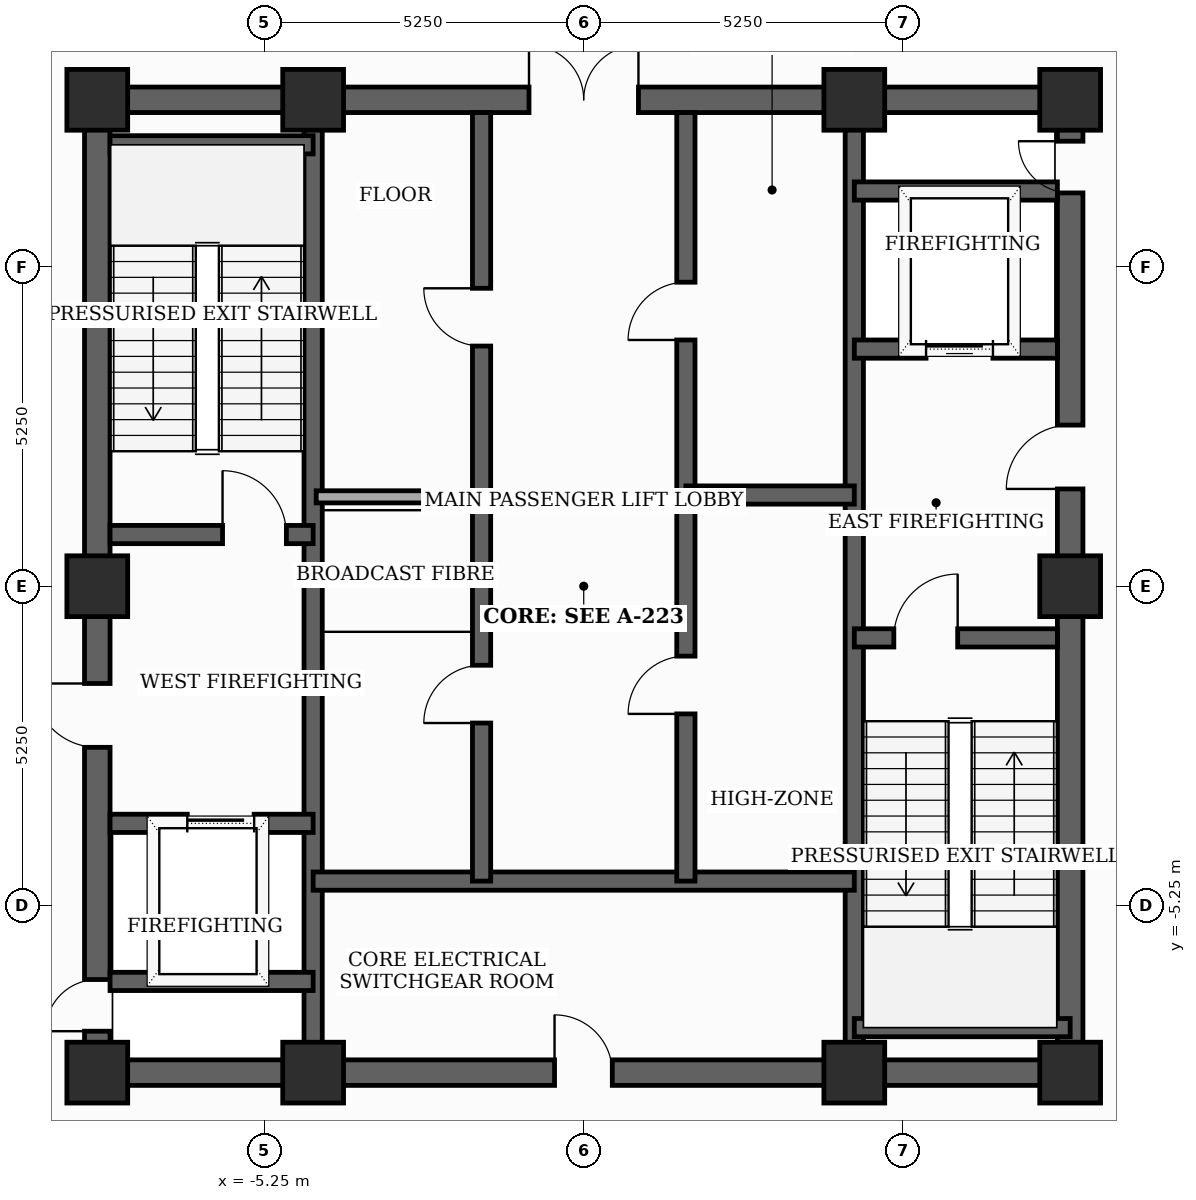
"""IFC4 building model, lengths in metres.
Left out: names, types, materials, properties, quantities, classifications, styles, units other than length and angle.
Written with IfcOpenShell. Run it as: python <this file> out.ifc"""

import sys

from ifc_helpers import new_model, si_unit, direction, frame, frame_2d, origin, origin_2d, place, context, subcontext, project, spatial, rectangle, extrude, element, fill, save


model = new_model("IFC4")
c1 = context("Model", 3, precision=1e-05, world=origin(), true_north=direction((0.0, 1.0)))
c2 = subcontext(c1, "Body", "Model", "MODEL_VIEW")
j1 = project(units=[si_unit("LENGTHUNIT", "METRE"), si_unit("PLANEANGLEUNIT", "RADIAN")], contexts=[c1])
p1 = place(None, origin())
s1 = spatial("IfcSite", under=j1, at=p1, CompositionType="ELEMENT")
p2 = place(p1, origin())
s2 = spatial("IfcBuilding", under=s1, at=p2, CompositionType="ELEMENT")
p3 = place(p2, frame((0.0, 0.0, 317.4)))
s3 = spatial("IfcBuildingStorey", under=s2, at=p3, CompositionType="ELEMENT", Elevation=317.4)
for number, where, z_axis, x_axis in (
    (1, (-8.0, -8.0, 0.0), (0.0, 0.0, 1.0), (1.0, 0.0, 0.0)),
    (2, (-4.45, -8.0, 0.0), (0.0, 0.0, 1.0), (1.0, 0.0, 0.0)),
    (3, (4.45, -8.0, 0.0), (0.0, 0.0, 1.0), (1.0, 0.0, 0.0)),
    (4, (8.0, -8.0, 0.0), (0.0, 0.0, 1.0), (1.0, 0.0, 0.0)),
    (5, (8.0, 0.0, 0.0), (0.0, 0.0, 1.0), (1.0, 0.0, 0.0)),
    (6, (8.0, 8.0, 0.0), (0.0, 0.0, 1.0), (1.0, 0.0, 0.0)),
    (7, (4.45, 8.0, 0.0), (0.0, 0.0, 1.0), (1.0, 0.0, 0.0)),
    (8, (-4.45, 8.0, 0.0), (0.0, 0.0, 1.0), (1.0, 0.0, 0.0)),
    (9, (-8.0, 8.0, 0.0), (0.0, 0.0, 1.0), (1.0, 0.0, 0.0)),
    (10, (-8.0, 0.0, 0.0), (0.0, 0.0, 1.0), (1.0, 0.0, 0.0)),
):
    element("IfcColumn", number, at=place(p3, frame(where, z_axis=z_axis, x_axis=x_axis)), inside=s3, PredefinedType="COLUMN", context=c2, shape_type="SweptSolid", body=[
        extrude(rectangle(XDim=1.0, YDim=1.0, at=origin_2d()), origin(), (0.0, 0.0, 1.0), 4.6),
    ])
p4 = place(p3, frame((-8.0, -8.0, 0.0), z_axis=(0.0, 0.0, 1.0), x_axis=(0.0, 1.0, 0.0)))
e11 = element("IfcWall", 11, at=p4, inside=s3, PredefinedType="SHEAR", context=c2, shape_type="SweptSolid", body=[
    extrude(rectangle(XDim=16.0, YDim=0.42, at=frame_2d((8.0, 0.0))), origin(), (0.0, 0.0, 1.0), 4.38),
])
p5 = place(p4, frame((0.681, 0.0, 0.0)))
e12 = element("IfcOpeningElement", 12, at=p5, cuts=e11, PredefinedType="OPENING", context=c2, shape_type="SweptSolid", body=[
    extrude(rectangle(XDim=0.85, YDim=2.02, at=frame_2d((0.425, 1.01))), frame((0.0, 0.22, 0.0), z_axis=(0.0, -1.0, 0.0), x_axis=(1.0, 0.0, 0.0)), (0.0, 0.0, 1.0), 0.44),
])
p6 = place(p4, frame((5.35, 0.0, 0.0)))
e13 = element("IfcOpeningElement", 13, at=p6, cuts=e11, PredefinedType="OPENING", context=c2, shape_type="SweptSolid", body=[
    extrude(rectangle(XDim=1.05, YDim=2.15, at=frame_2d((0.525, 1.075))), frame((0.0, 0.22, 0.0), z_axis=(0.0, -1.0, 0.0), x_axis=(1.0, 0.0, 0.0)), (0.0, 0.0, 1.0), 0.44),
])
p7 = place(p3, frame((8.0, -8.0, 0.0), z_axis=(0.0, 0.0, 1.0), x_axis=(0.0, 1.0, 0.0)))
e14 = element("IfcWall", 14, at=p7, inside=s3, PredefinedType="SHEAR", context=c2, shape_type="SweptSolid", body=[
    extrude(rectangle(XDim=16.0, YDim=0.42, at=frame_2d((8.0, 0.0))), origin(), (0.0, 0.0, 1.0), 4.38),
])
p8 = place(p7, frame((9.6, 0.0, 0.0)))
e15 = element("IfcOpeningElement", 15, at=p8, cuts=e14, PredefinedType="OPENING", context=c2, shape_type="SweptSolid", body=[
    extrude(rectangle(XDim=1.05, YDim=2.15, at=frame_2d((0.525, 1.075))), frame((0.0, 0.22, 0.0), z_axis=(0.0, -1.0, 0.0), x_axis=(1.0, 0.0, 0.0)), (0.0, 0.0, 1.0), 0.44),
])
p9 = place(p7, frame((14.469, 0.0, 0.0)))
e16 = element("IfcOpeningElement", 16, at=p9, cuts=e14, PredefinedType="OPENING", context=c2, shape_type="SweptSolid", body=[
    extrude(rectangle(XDim=0.85, YDim=2.02, at=frame_2d((0.425, 1.01))), frame((0.0, 0.22, 0.0), z_axis=(0.0, -1.0, 0.0), x_axis=(1.0, 0.0, 0.0)), (0.0, 0.0, 1.0), 0.44),
])
p10 = place(p3, frame((-8.0, -8.0, 0.0), z_axis=(0.0, 0.0, 1.0), x_axis=(1.0, 0.0, 0.0)))
e17 = element("IfcWall", 17, at=p10, inside=s3, PredefinedType="SHEAR", context=c2, shape_type="SweptSolid", body=[
    extrude(rectangle(XDim=16.0, YDim=0.42, at=frame_2d((8.0, 0.0))), origin(), (0.0, 0.0, 1.0), 4.38),
])
p11 = place(p10, frame((7.52, 0.0, 0.0)))
e18 = element("IfcOpeningElement", 18, at=p11, cuts=e17, PredefinedType="OPENING", context=c2, shape_type="SweptSolid", body=[
    extrude(rectangle(XDim=0.95, YDim=2.1, at=frame_2d((0.475, 1.05))), frame((0.0, 0.22, 0.0), z_axis=(0.0, -1.0, 0.0), x_axis=(1.0, 0.0, 0.0)), (0.0, 0.0, 1.0), 0.44),
])
p12 = place(p3, frame((-8.0, 8.0, 0.0), z_axis=(0.0, 0.0, 1.0), x_axis=(1.0, 0.0, 0.0)))
e19 = element("IfcWall", 19, at=p12, inside=s3, PredefinedType="SHEAR", context=c2, shape_type="SweptSolid", body=[
    extrude(rectangle(XDim=16.0, YDim=0.42, at=frame_2d((8.0, 0.0))), origin(), (0.0, 0.0, 1.0), 4.38),
])
p13 = place(p12, frame((7.1, 0.0, 0.0)))
e20 = element("IfcOpeningElement", 20, at=p13, cuts=e19, PredefinedType="OPENING", context=c2, shape_type="SweptSolid", body=[
    extrude(rectangle(XDim=1.8, YDim=2.15, at=frame_2d((0.9, 1.075))), frame((0.0, 0.22, 0.0), z_axis=(0.0, -1.0, 0.0), x_axis=(1.0, 0.0, 0.0)), (0.0, 0.0, 1.0), 0.44),
])
for number, where, z_axis, x_axis in (
    (21, (-4.45, -7.79, 0.0), (0.0, 0.0, 1.0), (0.0, 1.0, 0.0)),
    (22, (4.45, -7.79, 0.0), (0.0, 0.0, 1.0), (0.0, 1.0, 0.0)),
):
    element("IfcWall", number, at=place(p3, frame(where, z_axis=z_axis, x_axis=x_axis)), inside=s3, PredefinedType="SHEAR", context=c2, shape_type="SweptSolid", body=[
        extrude(rectangle(XDim=15.58, YDim=0.3, at=frame_2d((7.79, 0.0))), origin(), (0.0, 0.0, 1.0), 4.38),
    ])
p14 = place(p3, frame((-7.79, 0.85, 0.0), z_axis=(0.0, 0.0, 1.0), x_axis=(1.0, 0.0, 0.0)))
e23 = element("IfcWall", 23, at=p14, inside=s3, PredefinedType="SHEAR", context=c2, shape_type="SweptSolid", body=[
    extrude(rectangle(XDim=3.34, YDim=0.3, at=frame_2d((1.67, 0.0))), origin(), (0.0, 0.0, 1.0), 4.38),
])
p15 = place(p14, frame((1.85, 0.0, 0.0)))
e24 = element("IfcOpeningElement", 24, at=p15, cuts=e23, PredefinedType="OPENING", context=c2, shape_type="SweptSolid", body=[
    extrude(rectangle(XDim=1.05, YDim=2.15, at=frame_2d((0.525, 1.075))), frame((0.0, 0.16, 0.0), z_axis=(0.0, -1.0, 0.0), x_axis=(1.0, 0.0, 0.0)), (0.0, 0.0, 1.0), 0.32),
])
p16 = place(p3, frame((-7.79, 7.26, 0.0), z_axis=(0.0, 0.0, 1.0), x_axis=(1.0, 0.0, 0.0)))
e25 = element("IfcWall", 25, at=p16, inside=s3, PredefinedType="SHEAR", context=c2, shape_type="SweptSolid", body=[
    extrude(rectangle(XDim=3.34, YDim=0.3, at=frame_2d((1.67, 0.0))), origin(), (0.0, 0.0, 1.0), 4.38),
])
p17 = place(p3, frame((4.45, -0.85, 0.0), z_axis=(0.0, 0.0, 1.0), x_axis=(1.0, 0.0, 0.0)))
e26 = element("IfcWall", 26, at=p17, inside=s3, PredefinedType="SHEAR", context=c2, shape_type="SweptSolid", body=[
    extrude(rectangle(XDim=3.34, YDim=0.3, at=frame_2d((1.67, 0.0))), origin(), (0.0, 0.0, 1.0), 4.38),
])
p18 = place(p17, frame((0.65, 0.0, 0.0)))
e27 = element("IfcOpeningElement", 27, at=p18, cuts=e26, PredefinedType="OPENING", context=c2, shape_type="SweptSolid", body=[
    extrude(rectangle(XDim=1.05, YDim=2.15, at=frame_2d((0.525, 1.075))), frame((0.0, 0.16, 0.0), z_axis=(0.0, -1.0, 0.0), x_axis=(1.0, 0.0, 0.0)), (0.0, 0.0, 1.0), 0.32),
])
p19 = place(p3, frame((4.45, -7.26, 0.0), z_axis=(0.0, 0.0, 1.0), x_axis=(1.0, 0.0, 0.0)))
e28 = element("IfcWall", 28, at=p19, inside=s3, PredefinedType="SHEAR", context=c2, shape_type="SweptSolid", body=[
    extrude(rectangle(XDim=3.55, YDim=0.3, at=frame_2d((1.775, 0.0))), origin(), (0.0, 0.0, 1.0), 4.38),
])
p20 = place(p3, frame((-7.79, -3.9, 0.0), z_axis=(0.0, 0.0, 1.0), x_axis=(1.0, 0.0, 0.0)))
e29 = element("IfcWall", 29, at=p20, inside=s3, PredefinedType="SHEAR", context=c2, shape_type="SweptSolid", body=[
    extrude(rectangle(XDim=3.34, YDim=0.3, at=frame_2d((1.67, 0.0))), origin(), (0.0, 0.0, 1.0), 4.38),
])
p21 = place(p20, frame((1.27, 0.0, 0.0)))
e30 = element("IfcOpeningElement", 30, at=p21, cuts=e29, PredefinedType="OPENING", context=c2, shape_type="SweptSolid", body=[
    extrude(rectangle(XDim=1.1, YDim=2.1, at=frame_2d((0.55, 1.05))), frame((0.0, 0.16, 0.0), z_axis=(0.0, -1.0, 0.0), x_axis=(1.0, 0.0, 0.0)), (0.0, 0.0, 1.0), 0.32),
])
p22 = place(p3, frame((-7.79, -6.5, 0.0), z_axis=(0.0, 0.0, 1.0), x_axis=(1.0, 0.0, 0.0)))
e31 = element("IfcWall", 31, at=p22, inside=s3, PredefinedType="SHEAR", context=c2, shape_type="SweptSolid", body=[
    extrude(rectangle(XDim=3.34, YDim=0.3, at=frame_2d((1.67, 0.0))), origin(), (0.0, 0.0, 1.0), 4.38),
])
p23 = place(p3, frame((4.45, 3.9, 0.0), z_axis=(0.0, 0.0, 1.0), x_axis=(1.0, 0.0, 0.0)))
e32 = element("IfcWall", 32, at=p23, inside=s3, PredefinedType="SHEAR", context=c2, shape_type="SweptSolid", body=[
    extrude(rectangle(XDim=3.34, YDim=0.3, at=frame_2d((1.67, 0.0))), origin(), (0.0, 0.0, 1.0), 4.38),
])
p24 = place(p23, frame((1.18, 0.0, 0.0)))
e33 = element("IfcOpeningElement", 33, at=p24, cuts=e32, PredefinedType="OPENING", context=c2, shape_type="SweptSolid", body=[
    extrude(rectangle(XDim=1.1, YDim=2.1, at=frame_2d((0.55, 1.05))), frame((0.0, 0.16, 0.0), z_axis=(0.0, -1.0, 0.0), x_axis=(1.0, 0.0, 0.0)), (0.0, 0.0, 1.0), 0.32),
])
p25 = place(p3, frame((4.45, 6.5, 0.0), z_axis=(0.0, 0.0, 1.0), x_axis=(1.0, 0.0, 0.0)))
e34 = element("IfcWall", 34, at=p25, inside=s3, PredefinedType="SHEAR", context=c2, shape_type="SweptSolid", body=[
    extrude(rectangle(XDim=3.34, YDim=0.3, at=frame_2d((1.67, 0.0))), origin(), (0.0, 0.0, 1.0), 4.38),
])
p26 = place(p3, frame((-4.45, -4.85, 0.0), z_axis=(0.0, 0.0, 1.0), x_axis=(1.0, 0.0, 0.0)))
e35 = element("IfcWall", 35, at=p26, inside=s3, PredefinedType="SHEAR", context=c2, shape_type="SweptSolid", body=[
    extrude(rectangle(XDim=8.9, YDim=0.3, at=frame_2d((4.45, 0.0))), origin(), (0.0, 0.0, 1.0), 4.38),
])
p27 = place(p3, frame((-1.68, -4.85, 0.0), z_axis=(0.0, 0.0, 1.0), x_axis=(0.0, 1.0, 0.0)))
e36 = element("IfcWall", 36, at=p27, inside=s3, PredefinedType="SHEAR", context=c2, shape_type="SweptSolid", body=[
    extrude(rectangle(XDim=12.64, YDim=0.3, at=frame_2d((6.32, 0.0))), origin(), (0.0, 0.0, 1.0), 4.38),
])
p28 = place(p27, frame((2.6, 0.0, 0.0)))
e37 = element("IfcOpeningElement", 37, at=p28, cuts=e36, PredefinedType="OPENING", context=c2, shape_type="SweptSolid", body=[
    extrude(rectangle(XDim=0.95, YDim=2.1, at=frame_2d((0.475, 1.05))), frame((0.0, 0.16, 0.0), z_axis=(0.0, -1.0, 0.0), x_axis=(1.0, 0.0, 0.0)), (0.0, 0.0, 1.0), 0.32),
])
p29 = place(p27, frame((8.8, 0.0, 0.0)))
e38 = element("IfcOpeningElement", 38, at=p29, cuts=e36, PredefinedType="OPENING", context=c2, shape_type="SweptSolid", body=[
    extrude(rectangle(XDim=0.95, YDim=2.1, at=frame_2d((0.475, 1.05))), frame((0.0, 0.16, 0.0), z_axis=(0.0, -1.0, 0.0), x_axis=(1.0, 0.0, 0.0)), (0.0, 0.0, 1.0), 0.32),
])
p30 = place(p3, frame((1.68, -4.85, 0.0), z_axis=(0.0, 0.0, 1.0), x_axis=(0.0, 1.0, 0.0)))
e39 = element("IfcWall", 39, at=p30, inside=s3, PredefinedType="SHEAR", context=c2, shape_type="SweptSolid", body=[
    extrude(rectangle(XDim=12.64, YDim=0.3, at=frame_2d((6.32, 0.0))), origin(), (0.0, 0.0, 1.0), 4.38),
])
p31 = place(p30, frame((2.75, 0.0, 0.0)))
e40 = element("IfcOpeningElement", 40, at=p31, cuts=e39, PredefinedType="OPENING", context=c2, shape_type="SweptSolid", body=[
    extrude(rectangle(XDim=0.95, YDim=2.1, at=frame_2d((0.475, 1.05))), frame((0.0, 0.16, 0.0), z_axis=(0.0, -1.0, 0.0), x_axis=(1.0, 0.0, 0.0)), (0.0, 0.0, 1.0), 0.32),
])
p32 = place(p30, frame((8.9, 0.0, 0.0)))
e41 = element("IfcOpeningElement", 41, at=p32, cuts=e39, PredefinedType="OPENING", context=c2, shape_type="SweptSolid", body=[
    extrude(rectangle(XDim=0.95, YDim=2.1, at=frame_2d((0.475, 1.05))), frame((0.0, 0.16, 0.0), z_axis=(0.0, -1.0, 0.0), x_axis=(1.0, 0.0, 0.0)), (0.0, 0.0, 1.0), 0.32),
])
p33 = place(p3, frame((1.68, 1.5, 0.0), z_axis=(0.0, 0.0, 1.0), x_axis=(1.0, 0.0, 0.0)))
e42 = element("IfcWall", 42, at=p33, inside=s3, PredefinedType="SHEAR", context=c2, shape_type="SweptSolid", body=[
    extrude(rectangle(XDim=2.77, YDim=0.3, at=frame_2d((1.385, 0.0))), origin(), (0.0, 0.0, 1.0), 4.38),
])
p34 = place(p3, frame((-4.4, 1.47, 0.0), z_axis=(0.0, 0.0, 1.0), x_axis=(1.0, 0.0, 0.0)))
e43 = element("IfcWall", 43, at=p34, inside=s3, PredefinedType="SOLIDWALL", context=c2, shape_type="SweptSolid", body=[
    extrude(rectangle(XDim=2.68, YDim=0.2, at=frame_2d((1.34, 0.0))), origin(), (0.0, 0.0, 1.0), 2.685),
])
p35 = place(p5, origin())
e44 = element("IfcDoor", 44, at=p35, inside=s3, OperationType="SINGLE_SWING_LEFT", PredefinedType="TRAPDOOR", context=c2, shape_type="SweptSolid", body=[
    extrude(rectangle(XDim=0.85, YDim=2.02, at=frame_2d((0.425, 1.01))), frame((0.0, 0.025, 0.0), z_axis=(0.0, -1.0, 0.0), x_axis=(1.0, 0.0, 0.0)), (0.0, 0.0, 1.0), 0.05),
])
fill(e12, e44)
p36 = place(p6, origin())
e45 = element("IfcDoor", 45, at=p36, inside=s3, OperationType="SINGLE_SWING_RIGHT", PredefinedType="DOOR", context=c2, shape_type="SweptSolid", body=[
    extrude(rectangle(XDim=1.05, YDim=2.15, at=frame_2d((0.525, 1.075))), frame((0.0, 0.025, 0.0), z_axis=(0.0, -1.0, 0.0), x_axis=(1.0, 0.0, 0.0)), (0.0, 0.0, 1.0), 0.05),
])
fill(e13, e45)
p37 = place(p8, origin())
e46 = element("IfcDoor", 46, at=p37, inside=s3, OperationType="SINGLE_SWING_LEFT", PredefinedType="DOOR", context=c2, shape_type="SweptSolid", body=[
    extrude(rectangle(XDim=1.05, YDim=2.15, at=frame_2d((0.525, 1.075))), frame((0.0, 0.025, 0.0), z_axis=(0.0, -1.0, 0.0), x_axis=(1.0, 0.0, 0.0)), (0.0, 0.0, 1.0), 0.05),
])
fill(e15, e46)
p38 = place(p9, origin())
e47 = element("IfcDoor", 47, at=p38, inside=s3, OperationType="SINGLE_SWING_RIGHT", PredefinedType="TRAPDOOR", context=c2, shape_type="SweptSolid", body=[
    extrude(rectangle(XDim=0.85, YDim=2.02, at=frame_2d((0.425, 1.01))), frame((0.0, 0.025, 0.0), z_axis=(0.0, -1.0, 0.0), x_axis=(1.0, 0.0, 0.0)), (0.0, 0.0, 1.0), 0.05),
])
fill(e16, e47)
p39 = place(p11, origin())
e48 = element("IfcDoor", 48, at=p39, inside=s3, OperationType="SINGLE_SWING_LEFT", PredefinedType="DOOR", context=c2, shape_type="SweptSolid", body=[
    extrude(rectangle(XDim=0.95, YDim=2.1, at=frame_2d((0.475, 1.05))), frame((0.0, 0.025, 0.0), z_axis=(0.0, -1.0, 0.0), x_axis=(1.0, 0.0, 0.0)), (0.0, 0.0, 1.0), 0.05),
])
fill(e18, e48)
p40 = place(p13, origin())
e49 = element("IfcDoor", 49, at=p40, inside=s3, OperationType="DOUBLE_DOOR_SINGLE_SWING", PredefinedType="DOOR", context=c2, shape_type="SweptSolid", body=[
    extrude(rectangle(XDim=1.8, YDim=2.15, at=frame_2d((0.9, 1.075))), frame((0.0, 0.025, 0.0), z_axis=(0.0, -1.0, 0.0), x_axis=(1.0, 0.0, 0.0)), (0.0, 0.0, 1.0), 0.05),
])
fill(e20, e49)
p41 = place(p15, origin())
e50 = element("IfcDoor", 50, at=p41, inside=s3, OperationType="SINGLE_SWING_LEFT", PredefinedType="DOOR", context=c2, shape_type="SweptSolid", body=[
    extrude(rectangle(XDim=1.05, YDim=2.15, at=frame_2d((0.525, 1.075))), frame((0.0, 0.025, 0.0), z_axis=(0.0, -1.0, 0.0), x_axis=(1.0, 0.0, 0.0)), (0.0, 0.0, 1.0), 0.05),
])
fill(e24, e50)
p42 = place(p18, origin())
e51 = element("IfcDoor", 51, at=p42, inside=s3, OperationType="SINGLE_SWING_RIGHT", PredefinedType="DOOR", context=c2, shape_type="SweptSolid", body=[
    extrude(rectangle(XDim=1.05, YDim=2.15, at=frame_2d((0.525, 1.075))), frame((0.0, 0.025, 0.0), z_axis=(0.0, -1.0, 0.0), x_axis=(1.0, 0.0, 0.0)), (0.0, 0.0, 1.0), 0.05),
])
fill(e27, e51)
p43 = place(p21, origin())
e52 = element("IfcDoor", 52, at=p43, inside=s3, OperationType="SLIDING_TO_LEFT", PredefinedType="DOOR", context=c2, shape_type="SweptSolid", body=[
    extrude(rectangle(XDim=1.1, YDim=2.1, at=frame_2d((0.55, 1.05))), frame((0.0, 0.025, 0.0), z_axis=(0.0, -1.0, 0.0), x_axis=(1.0, 0.0, 0.0)), (0.0, 0.0, 1.0), 0.05),
])
fill(e30, e52)
p44 = place(p24, origin())
e53 = element("IfcDoor", 53, at=p44, inside=s3, OperationType="SLIDING_TO_LEFT", PredefinedType="DOOR", context=c2, shape_type="SweptSolid", body=[
    extrude(rectangle(XDim=1.1, YDim=2.1, at=frame_2d((0.55, 1.05))), frame((0.0, 0.025, 0.0), z_axis=(0.0, -1.0, 0.0), x_axis=(1.0, 0.0, 0.0)), (0.0, 0.0, 1.0), 0.05),
])
fill(e33, e53)
p45 = place(p28, origin())
e54 = element("IfcDoor", 54, at=p45, inside=s3, OperationType="SINGLE_SWING_LEFT", PredefinedType="DOOR", context=c2, shape_type="SweptSolid", body=[
    extrude(rectangle(XDim=0.95, YDim=2.1, at=frame_2d((0.475, 1.05))), frame((0.0, 0.025, 0.0), z_axis=(0.0, -1.0, 0.0), x_axis=(1.0, 0.0, 0.0)), (0.0, 0.0, 1.0), 0.05),
])
fill(e37, e54)
p46 = place(p29, origin())
e55 = element("IfcDoor", 55, at=p46, inside=s3, OperationType="SINGLE_SWING_RIGHT", PredefinedType="DOOR", context=c2, shape_type="SweptSolid", body=[
    extrude(rectangle(XDim=0.95, YDim=2.1, at=frame_2d((0.475, 1.05))), frame((0.0, 0.025, 0.0), z_axis=(0.0, -1.0, 0.0), x_axis=(1.0, 0.0, 0.0)), (0.0, 0.0, 1.0), 0.05),
])
fill(e38, e55)
p47 = place(p31, origin())
e56 = element("IfcDoor", 56, at=p47, inside=s3, OperationType="SINGLE_SWING_LEFT", PredefinedType="DOOR", context=c2, shape_type="SweptSolid", body=[
    extrude(rectangle(XDim=0.95, YDim=2.1, at=frame_2d((0.475, 1.05))), frame((0.0, 0.025, 0.0), z_axis=(0.0, -1.0, 0.0), x_axis=(1.0, 0.0, 0.0)), (0.0, 0.0, 1.0), 0.05),
])
fill(e40, e56)
p48 = place(p32, origin())
e57 = element("IfcDoor", 57, at=p48, inside=s3, OperationType="SINGLE_SWING_LEFT", PredefinedType="DOOR", context=c2, shape_type="SweptSolid", body=[
    extrude(rectangle(XDim=0.95, YDim=2.1, at=frame_2d((0.475, 1.05))), frame((0.0, 0.025, 0.0), z_axis=(0.0, -1.0, 0.0), x_axis=(1.0, 0.0, 0.0)), (0.0, 0.0, 1.0), 0.05),
])
fill(e41, e57)
save(model, sys.argv[1])
